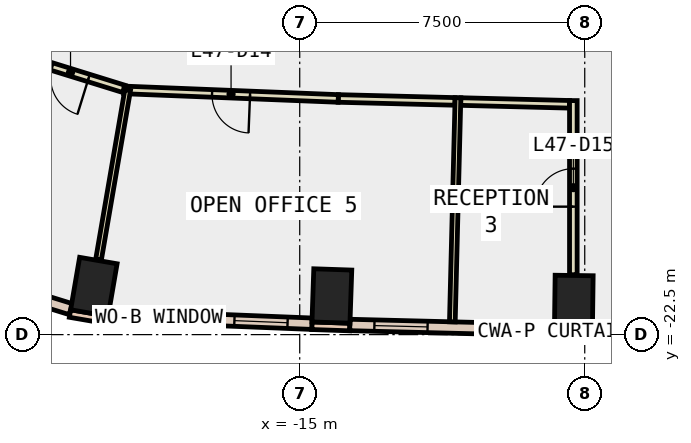
"""IFC4 building model, lengths in metres.
Left out: names, types, materials, properties, quantities, classifications, styles, units other than length and angle.
Written with IfcOpenShell. Run it as: python <this file> out.ifc"""

import sys

from ifc_helpers import new_model, si_unit, direction, frame, frame_2d, origin, origin_2d, place, context, subcontext, project, spatial, rectangle, extrude, element, fill, save


model = new_model("IFC4")
c1 = context("Model", 3, precision=1e-05, world=origin(), true_north=direction((0.0, 1.0)))
c2 = subcontext(c1, "Body", "Model", "MODEL_VIEW")
j1 = project(units=[si_unit("LENGTHUNIT", "METRE"), si_unit("PLANEANGLEUNIT", "RADIAN")], contexts=[c1])
p1 = place(None, origin())
s1 = spatial("IfcSite", under=j1, at=p1, CompositionType="ELEMENT")
p2 = place(p1, origin())
s2 = spatial("IfcBuilding", under=s1, at=p2, CompositionType="ELEMENT")
p3 = place(p2, frame((0.0, 0.0, 210.8)))
s3 = spatial("IfcBuildingStorey", under=s2, at=p3, CompositionType="ELEMENT", Elevation=210.8)
for number, where, z_axis, x_axis in (
    (1, (-20.417, -21.241, -0.4), (0.0, 0.0, 1.0), (-0.986, 0.169, 0.0)),
    (2, (-14.154, -21.484, -0.4), (0.0, 0.0, 1.0), (-0.999, 0.034, 0.0)),
    (3, (-7.788, -21.644, -0.4), (0.0, 0.0, 1.0), (-1.0, 0.013, 0.0)),
):
    element("IfcColumn", number, at=place(p3, frame(where, z_axis=z_axis, x_axis=x_axis)), inside=s3, PredefinedType="COLUMN", context=c2, shape_type="SweptSolid", body=[
        extrude(rectangle(XDim=1.0, YDim=1.4, at=origin_2d()), origin(), (0.0, 0.0, 1.0), 4.2),
    ])
p4 = place(p3, frame((-21.045, -21.945, 0.0), z_axis=(0.0, 0.0, 1.0), x_axis=(0.985631544579, -0.168909615862, 0.0)))
e4 = element("IfcWall", 4, at=p4, inside=s3, PredefinedType="STANDARD", context=c2, shape_type="SweptSolid", body=[
    extrude(rectangle(XDim=1.0, YDim=0.2, at=frame_2d((0.5, 0.0))), origin(), (0.0, 0.0, 1.0), 3.8),
])
p5 = place(p3, frame((-14.681, -22.266, 0.0), z_axis=(0.0, 0.0, 1.0), x_axis=(0.999423561854, -0.033949138587, 0.0)))
e5 = element("IfcWall", 5, at=p5, inside=s3, PredefinedType="STANDARD", context=c2, shape_type="SweptSolid", body=[
    extrude(rectangle(XDim=1.0, YDim=0.2, at=frame_2d((0.5, 0.0))), origin(), (0.0, 0.0, 1.0), 3.8),
])
p6 = place(p3, frame((-8.299, -22.437, 0.0), z_axis=(0.0, 0.0, 1.0), x_axis=(0.999903186316, -0.013914668364, 0.0)))
e6 = element("IfcWall", 6, at=p6, inside=s3, PredefinedType="STANDARD", context=c2, shape_type="SweptSolid", body=[
    extrude(rectangle(XDim=1.0, YDim=0.2, at=frame_2d((0.5, 0.0))), origin(), (0.0, 0.0, 1.0), 3.8),
])
p7 = place(p3, frame((-20.04, -21.999, 0.0), z_axis=(0.0, 0.0, 1.0), x_axis=(0.999205241612, -0.039860822062, 0.0)))
e7 = element("IfcWall", 7, at=p7, inside=s3, PredefinedType="STANDARD", context=c2, shape_type="SweptSolid", body=[
    extrude(rectangle(XDim=5.365, YDim=0.3, at=frame_2d((2.683, 0.0))), origin(), (0.0, 0.0, 1.0), 3.8),
])
p8 = place(p7, frame((0.641, 0.0, 0.9)))
e8 = element("IfcOpeningElement", 8, at=p8, cuts=e7, PredefinedType="OPENING", context=c2, shape_type="SweptSolid", body=[
    extrude(rectangle(XDim=1.4, YDim=2.6, at=frame_2d((0.7, 1.3))), frame((0.0, 0.16, 0.0), z_axis=(0.0, -1.0, 0.0), x_axis=(1.0, 0.0, 0.0)), (0.0, 0.0, 1.0), 0.32),
])
p9 = place(p7, frame((3.324, 0.0, 0.9)))
e9 = element("IfcOpeningElement", 9, at=p9, cuts=e7, PredefinedType="OPENING", context=c2, shape_type="SweptSolid", body=[
    extrude(rectangle(XDim=1.4, YDim=2.6, at=frame_2d((0.7, 1.3))), frame((0.0, 0.16, 0.0), z_axis=(0.0, -1.0, 0.0), x_axis=(1.0, 0.0, 0.0)), (0.0, 0.0, 1.0), 0.32),
])
p10 = place(p3, frame((-13.681, -22.246, 0.0), z_axis=(0.0, 0.0, 1.0), x_axis=(0.999685717988, -0.025069209235, 0.0)))
e10 = element("IfcWall", 10, at=p10, inside=s3, PredefinedType="STANDARD", context=c2, shape_type="SweptSolid", body=[
    extrude(rectangle(XDim=5.385, YDim=0.3, at=frame_2d((2.693, 0.0))), origin(), (0.0, 0.0, 1.0), 3.8),
])
p11 = place(p10, frame((0.646, 0.0, 0.9)))
e11 = element("IfcOpeningElement", 11, at=p11, cuts=e10, PredefinedType="OPENING", context=c2, shape_type="SweptSolid", body=[
    extrude(rectangle(XDim=1.4, YDim=2.6, at=frame_2d((0.7, 1.3))), frame((0.0, 0.16, 0.0), z_axis=(0.0, -1.0, 0.0), x_axis=(1.0, 0.0, 0.0)), (0.0, 0.0, 1.0), 0.32),
])
p12 = place(p10, frame((3.339, 0.0, 0.9)))
e12 = element("IfcOpeningElement", 12, at=p12, cuts=e10, PredefinedType="OPENING", context=c2, shape_type="SweptSolid", body=[
    extrude(rectangle(XDim=1.4, YDim=2.6, at=frame_2d((0.7, 1.3))), frame((0.0, 0.16, 0.0), z_axis=(0.0, -1.0, 0.0), x_axis=(1.0, 0.0, 0.0)), (0.0, 0.0, 1.0), 0.32),
])
p13 = place(p3, frame((-24.999, -20.599, 0.0), z_axis=(0.0, 0.0, 1.0), x_axis=(0.955247215067, -0.295808651171, 0.0)))
e13 = element("IfcWall", 13, at=p13, inside=s3, PredefinedType="STANDARD", context=c2, shape_type="SweptSolid", body=[
    extrude(rectangle(XDim=4.161, YDim=0.3, at=frame_2d((2.081, 0.0))), origin(), (0.0, 0.0, 1.0), 3.8),
])
p14 = place(p13, frame((1.381, 0.0, 0.9)))
e14 = element("IfcOpeningElement", 14, at=p14, cuts=e13, PredefinedType="OPENING", context=c2, shape_type="SweptSolid", body=[
    extrude(rectangle(XDim=1.4, YDim=2.6, at=frame_2d((0.7, 1.3))), frame((0.0, 0.16, 0.0), z_axis=(0.0, -1.0, 0.0), x_axis=(1.0, 0.0, 0.0)), (0.0, 0.0, 1.0), 0.32),
])
p15 = place(p3, frame((-19.623, -16.035, 0.0), z_axis=(0.0, 0.0, 1.0), x_axis=(-0.955234616163, 0.295849333419, 0.0)))
e15 = element("IfcWall", 15, at=p15, inside=s3, PredefinedType="PARTITIONING", context=c2, shape_type="SweptSolid", body=[
    extrude(rectangle(XDim=2.947, YDim=0.2, at=frame_2d((1.473, 0.0))), origin(), (0.0, 0.0, 1.0), 3.8),
])
p16 = place(p15, frame((0.974, 0.0, 0.0)))
e16 = element("IfcOpeningElement", 16, at=p16, cuts=e15, PredefinedType="OPENING", context=c2, shape_type="SweptSolid", body=[
    extrude(rectangle(XDim=1.0, YDim=2.1, at=frame_2d((0.5, 1.05))), frame((0.0, 0.11, 0.0), z_axis=(0.0, -1.0, 0.0), x_axis=(1.0, 0.0, 0.0)), (0.0, 0.0, 1.0), 0.22),
])
p17 = place(p3, frame((-10.913, -16.364, 0.0), z_axis=(0.0, 0.0, 1.0), x_axis=(-0.999676990694, 0.02541484365, 0.0)))
e17 = element("IfcWall", 17, at=p17, inside=s3, PredefinedType="PARTITIONING", context=c2, shape_type="SweptSolid", body=[
    extrude(rectangle(XDim=3.074, YDim=0.2, at=frame_2d((1.537, 0.0))), origin(), (0.0, 0.0, 1.0), 3.8),
])
p18 = place(p3, frame((-13.986, -16.286, 0.0), z_axis=(0.0, 0.0, 1.0), x_axis=(-0.999206475857, 0.039829870775, 0.0)))
e18 = element("IfcWall", 18, at=p18, inside=s3, PredefinedType="PARTITIONING", context=c2, shape_type="SweptSolid", body=[
    extrude(rectangle(XDim=5.645, YDim=0.2, at=frame_2d((2.823, 0.0))), origin(), (0.0, 0.0, 1.0), 3.8),
])
p19 = place(p18, frame((2.323, 0.0, 0.0)))
e19 = element("IfcOpeningElement", 19, at=p19, cuts=e18, PredefinedType="OPENING", context=c2, shape_type="SweptSolid", body=[
    extrude(rectangle(XDim=1.0, YDim=2.1, at=frame_2d((0.5, 1.05))), frame((0.0, 0.11, 0.0), z_axis=(0.0, -1.0, 0.0), x_axis=(1.0, 0.0, 0.0)), (0.0, 0.0, 1.0), 0.22),
])
p20 = place(p3, frame((-7.9, -16.44, 0.0), z_axis=(0.0, 0.0, 1.0), x_axis=(-0.999675117104, 0.025488433531, 0.0)))
e20 = element("IfcWall", 20, at=p20, inside=s3, PredefinedType="PARTITIONING", context=c2, shape_type="SweptSolid", body=[
    extrude(rectangle(XDim=2.864, YDim=0.2, at=frame_2d((1.432, 0.0))), origin(), (0.0, 0.0, 1.0), 3.8),
])
p21 = place(p3, frame((-7.8, -20.924, 0.0), z_axis=(0.0, 0.0, 1.0), x_axis=(0.0, 1.0, 0.0)))
e21 = element("IfcWall", 21, at=p21, inside=s3, PredefinedType="PARTITIONING", context=c2, shape_type="SweptSolid", body=[
    extrude(rectangle(XDim=4.582, YDim=0.2, at=frame_2d((2.291, 0.0))), origin(), (0.0, 0.0, 1.0), 3.8),
])
p22 = place(p21, frame((1.791, 0.0, 0.0)))
e22 = element("IfcOpeningElement", 22, at=p22, cuts=e21, PredefinedType="OPENING", context=c2, shape_type="SweptSolid", body=[
    extrude(rectangle(XDim=1.0, YDim=2.1, at=frame_2d((0.5, 1.05))), frame((0.0, 0.11, 0.0), z_axis=(0.0, -1.0, 0.0), x_axis=(1.0, 0.0, 0.0)), (0.0, 0.0, 1.0), 0.22),
])
p23 = place(p3, frame((-19.527, -16.065, 0.0), z_axis=(0.0, 0.0, 1.0), x_axis=(-0.169437821314, -0.985540879268, 0.0)))
e23 = element("IfcWall", 23, at=p23, inside=s3, PredefinedType="PARTITIONING", context=c2, shape_type="SweptSolid", body=[
    extrude(rectangle(XDim=4.531, YDim=0.15, at=frame_2d((2.266, 0.0))), origin(), (0.0, 0.0, 1.0), 3.8),
])
p24 = place(p3, frame((-10.836, -16.266, 0.0), z_axis=(0.0, 0.0, 1.0), x_axis=(-0.025076969416, -0.999685523355, 0.0)))
e24 = element("IfcWall", 24, at=p24, inside=s3, PredefinedType="PARTITIONING", context=c2, shape_type="SweptSolid", body=[
    extrude(rectangle(XDim=5.9, YDim=0.15, at=frame_2d((2.95, 0.0))), origin(), (0.0, 0.0, 1.0), 3.8),
])
p25 = place(p8, origin())
e25 = element("IfcWindow", 25, at=p25, inside=s3, PartitioningType="SINGLE_PANEL", PredefinedType="WINDOW", context=c2, shape_type="SweptSolid", body=[
    extrude(rectangle(XDim=1.4, YDim=2.6, at=frame_2d((0.7, 1.3))), frame((0.0, 0.03, 0.0), z_axis=(0.0, -1.0, 0.0), x_axis=(1.0, 0.0, 0.0)), (0.0, 0.0, 1.0), 0.06),
])
fill(e8, e25)
p26 = place(p9, origin())
e26 = element("IfcWindow", 26, at=p26, inside=s3, PartitioningType="SINGLE_PANEL", PredefinedType="WINDOW", context=c2, shape_type="SweptSolid", body=[
    extrude(rectangle(XDim=1.4, YDim=2.6, at=frame_2d((0.7, 1.3))), frame((0.0, 0.03, 0.0), z_axis=(0.0, -1.0, 0.0), x_axis=(1.0, 0.0, 0.0)), (0.0, 0.0, 1.0), 0.06),
])
fill(e9, e26)
p27 = place(p11, origin())
e27 = element("IfcWindow", 27, at=p27, inside=s3, PartitioningType="SINGLE_PANEL", PredefinedType="WINDOW", context=c2, shape_type="SweptSolid", body=[
    extrude(rectangle(XDim=1.4, YDim=2.6, at=frame_2d((0.7, 1.3))), frame((0.0, 0.03, 0.0), z_axis=(0.0, -1.0, 0.0), x_axis=(1.0, 0.0, 0.0)), (0.0, 0.0, 1.0), 0.06),
])
fill(e11, e27)
p28 = place(p12, origin())
e28 = element("IfcWindow", 28, at=p28, inside=s3, PartitioningType="SINGLE_PANEL", PredefinedType="WINDOW", context=c2, shape_type="SweptSolid", body=[
    extrude(rectangle(XDim=1.4, YDim=2.6, at=frame_2d((0.7, 1.3))), frame((0.0, 0.03, 0.0), z_axis=(0.0, -1.0, 0.0), x_axis=(1.0, 0.0, 0.0)), (0.0, 0.0, 1.0), 0.06),
])
fill(e12, e28)
p29 = place(p16, origin())
e29 = element("IfcDoor", 29, at=p29, inside=s3, OperationType="SINGLE_SWING_LEFT", PredefinedType="DOOR", context=c2, shape_type="SweptSolid", body=[
    extrude(rectangle(XDim=1.0, YDim=2.1, at=frame_2d((0.5, 1.05))), frame((0.0, 0.025, 0.0), z_axis=(0.0, -1.0, 0.0), x_axis=(1.0, 0.0, 0.0)), (0.0, 0.0, 1.0), 0.05),
])
fill(e16, e29)
p30 = place(p19, origin())
e30 = element("IfcDoor", 30, at=p30, inside=s3, OperationType="SINGLE_SWING_LEFT", PredefinedType="DOOR", context=c2, shape_type="SweptSolid", body=[
    extrude(rectangle(XDim=1.0, YDim=2.1, at=frame_2d((0.5, 1.05))), frame((0.0, 0.025, 0.0), z_axis=(0.0, -1.0, 0.0), x_axis=(1.0, 0.0, 0.0)), (0.0, 0.0, 1.0), 0.05),
])
fill(e19, e30)
p31 = place(p22, origin())
e31 = element("IfcDoor", 31, at=p31, inside=s3, OperationType="SINGLE_SWING_LEFT", PredefinedType="DOOR", context=c2, shape_type="SweptSolid", body=[
    extrude(rectangle(XDim=1.0, YDim=2.1, at=frame_2d((0.5, 1.05))), frame((0.0, 0.025, 0.0), z_axis=(0.0, -1.0, 0.0), x_axis=(1.0, 0.0, 0.0)), (0.0, 0.0, 1.0), 0.05),
])
fill(e22, e31)
save(model, sys.argv[1])
